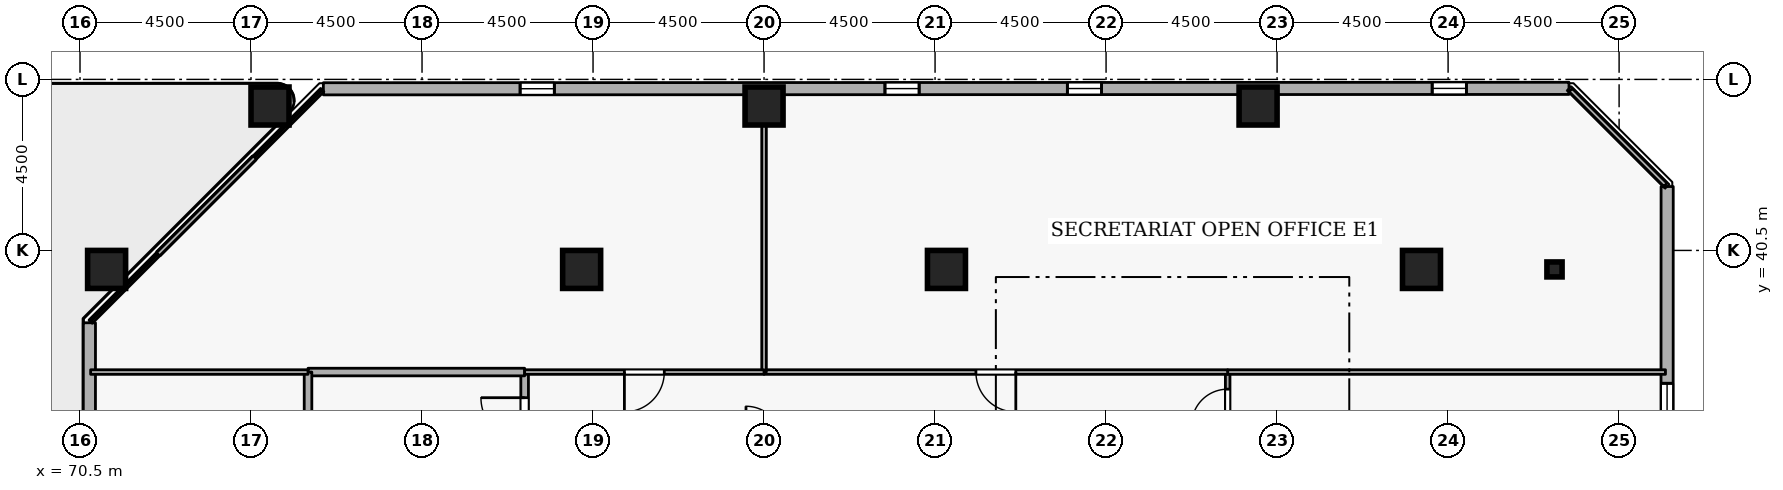
"""IFC4 building model, lengths in metres.
Left out: names, types, materials, properties, quantities, classifications, styles, units other than length and angle.
Written with IfcOpenShell. Run it as: python <this file> out.ifc"""

import sys

from ifc_helpers import new_model, si_unit, direction, frame, frame_2d, origin, origin_2d, place, context, subcontext, project, spatial, rectangle, i_section, extrude, element, fill, save


model = new_model("IFC4")
c1 = context("Model", 3, precision=1e-05, world=origin(), true_north=direction((0.0, 1.0)))
c2 = subcontext(c1, "Body", "Model", "MODEL_VIEW")
j1 = project(units=[si_unit("LENGTHUNIT", "METRE"), si_unit("PLANEANGLEUNIT", "RADIAN")], contexts=[c1])
p1 = place(None, origin())
s1 = spatial("IfcSite", under=j1, at=p1, CompositionType="ELEMENT")
p2 = place(p1, origin())
s2 = spatial("IfcBuilding", under=s1, at=p2, CompositionType="ELEMENT")
p3 = place(p2, frame((0.0, 0.0, 229.5)))
s3 = spatial("IfcBuildingStorey", under=s2, at=p3, CompositionType="ELEMENT", Elevation=229.5)
for number, where, z_axis, x_axis in (
    (1, (105.8, 40.0, 0.0), (0.0, 0.0, 1.0), (1.0, 0.0, 0.0)),
    (2, (101.5, 44.3, 0.0), (0.0, 0.0, 1.0), (1.0, 0.0, 0.0)),
    (3, (88.5, 44.3, 0.0), (0.0, 0.0, 1.0), (1.0, 0.0, 0.0)),
    (4, (75.5, 44.3, 0.0), (0.0, 0.0, 1.0), (1.0, 0.0, 0.0)),
    (5, (71.2, 40.0, 0.0), (0.0, 0.0, 1.0), (1.0, 0.0, 0.0)),
    (6, (93.3, 40.0, 0.0), (0.0, 0.0, 1.0), (1.0, 0.0, 0.0)),
    (7, (83.7, 40.0, 0.0), (0.0, 0.0, 1.0), (1.0, 0.0, 0.0)),
):
    element("IfcColumn", number, at=place(p3, frame(where, z_axis=z_axis, x_axis=x_axis)), inside=s3, PredefinedType="COLUMN", context=c2, shape_type="SweptSolid", body=[
        extrude(rectangle(XDim=1.0, YDim=1.0, at=origin_2d()), origin(), (0.0, 0.0, 1.0), 3.6),
    ])
p4 = place(p3, frame((109.3, 40.0, 0.0), z_axis=(0.0, 0.0, 1.0), x_axis=(1.0, 0.0, 0.0)))
e8 = element("IfcColumn", 8, at=p4, inside=s3, PredefinedType="COLUMN", context=c2, shape_type="SweptSolid", body=[
    extrude(i_section(OverallWidth=0.399, OverallDepth=0.394, WebThickness=0.023, FlangeThickness=0.037, FilletRadius=0.015, at=origin_2d()), origin(), (0.0, 0.0, 1.0), 3.6),
])
p5 = place(p3, frame((112.253, 9.404, 0.0), z_axis=(0.0, 0.0, 1.0), x_axis=(0.000364968916, 0.999999933399, 0.0)))
e9 = element("IfcWall", 9, at=p5, inside=s3, PredefinedType="STANDARD", context=c2, shape_type="SweptSolid", body=[
    extrude(rectangle(XDim=32.778, YDim=0.32, at=frame_2d((16.389, 0.0))), origin(), (0.0, 0.0, 1.0), 2.7),
])
p6 = place(p5, frame((2.7, 0.0, 0.72)))
e10 = element("IfcOpeningElement", 10, at=p6, cuts=e9, PredefinedType="OPENING", context=c2, shape_type="SweptSolid", body=[
    extrude(rectangle(XDim=0.9, YDim=1.75, at=frame_2d((0.45, 0.875))), frame((0.0, 0.17, 0.0), z_axis=(0.0, -1.0, 0.0), x_axis=(1.0, 0.0, 0.0)), (0.0, 0.0, 1.0), 0.34),
])
p7 = place(p5, frame((12.3, 0.0, 0.72)))
e11 = element("IfcOpeningElement", 11, at=p7, cuts=e9, PredefinedType="OPENING", context=c2, shape_type="SweptSolid", body=[
    extrude(rectangle(XDim=0.9, YDim=1.75, at=frame_2d((0.45, 0.875))), frame((0.0, 0.17, 0.0), z_axis=(0.0, -1.0, 0.0), x_axis=(1.0, 0.0, 0.0)), (0.0, 0.0, 1.0), 0.34),
])
p8 = place(p5, frame((17.1, 0.0, 0.72)))
e12 = element("IfcOpeningElement", 12, at=p8, cuts=e9, PredefinedType="OPENING", context=c2, shape_type="SweptSolid", body=[
    extrude(rectangle(XDim=0.9, YDim=1.75, at=frame_2d((0.45, 0.875))), frame((0.0, 0.17, 0.0), z_axis=(0.0, -1.0, 0.0), x_axis=(1.0, 0.0, 0.0)), (0.0, 0.0, 1.0), 0.34),
])
p9 = place(p5, frame((21.9, 0.0, 0.72)))
e13 = element("IfcOpeningElement", 13, at=p9, cuts=e9, PredefinedType="OPENING", context=c2, shape_type="SweptSolid", body=[
    extrude(rectangle(XDim=0.9, YDim=1.75, at=frame_2d((0.45, 0.875))), frame((0.0, 0.17, 0.0), z_axis=(0.0, -1.0, 0.0), x_axis=(1.0, 0.0, 0.0)), (0.0, 0.0, 1.0), 0.34),
])
p10 = place(p5, frame((26.7, 0.0, 0.72)))
e14 = element("IfcOpeningElement", 14, at=p10, cuts=e9, PredefinedType="OPENING", context=c2, shape_type="SweptSolid", body=[
    extrude(rectangle(XDim=0.9, YDim=1.75, at=frame_2d((0.45, 0.875))), frame((0.0, 0.17, 0.0), z_axis=(0.0, -1.0, 0.0), x_axis=(1.0, 0.0, 0.0)), (0.0, 0.0, 1.0), 0.34),
])
p11 = place(p3, frame((109.681, 44.765, 0.0), z_axis=(0.0, 0.0, 1.0), x_axis=(-0.999999933399, -0.000364968916, 0.0)))
e15 = element("IfcWall", 15, at=p11, inside=s3, PredefinedType="STANDARD", context=c2, shape_type="SweptSolid", body=[
    extrude(rectangle(XDim=32.778, YDim=0.32, at=frame_2d((16.389, 0.0))), origin(), (0.0, 0.0, 1.0), 2.7),
])
p12 = place(p11, frame((2.7, 0.0, 0.72)))
e16 = element("IfcOpeningElement", 16, at=p12, cuts=e15, PredefinedType="OPENING", context=c2, shape_type="SweptSolid", body=[
    extrude(rectangle(XDim=0.9, YDim=1.75, at=frame_2d((0.45, 0.875))), frame((0.0, 0.17, 0.0), z_axis=(0.0, -1.0, 0.0), x_axis=(1.0, 0.0, 0.0)), (0.0, 0.0, 1.0), 0.34),
])
p13 = place(p11, frame((12.3, 0.0, 0.72)))
e17 = element("IfcOpeningElement", 17, at=p13, cuts=e15, PredefinedType="OPENING", context=c2, shape_type="SweptSolid", body=[
    extrude(rectangle(XDim=0.9, YDim=1.75, at=frame_2d((0.45, 0.875))), frame((0.0, 0.17, 0.0), z_axis=(0.0, -1.0, 0.0), x_axis=(1.0, 0.0, 0.0)), (0.0, 0.0, 1.0), 0.34),
])
p14 = place(p11, frame((17.1, 0.0, 0.72)))
e18 = element("IfcOpeningElement", 18, at=p14, cuts=e15, PredefinedType="OPENING", context=c2, shape_type="SweptSolid", body=[
    extrude(rectangle(XDim=0.9, YDim=1.75, at=frame_2d((0.45, 0.875))), frame((0.0, 0.17, 0.0), z_axis=(0.0, -1.0, 0.0), x_axis=(1.0, 0.0, 0.0)), (0.0, 0.0, 1.0), 0.34),
])
p15 = place(p11, frame((26.7, 0.0, 0.72)))
e19 = element("IfcOpeningElement", 19, at=p15, cuts=e15, PredefinedType="OPENING", context=c2, shape_type="SweptSolid", body=[
    extrude(rectangle(XDim=0.9, YDim=1.75, at=frame_2d((0.45, 0.875))), frame((0.0, 0.17, 0.0), z_axis=(0.0, -1.0, 0.0), x_axis=(1.0, 0.0, 0.0)), (0.0, 0.0, 1.0), 0.34),
])
p16 = place(p3, frame((70.747, 38.596, 0.0), z_axis=(0.0, 0.0, 1.0), x_axis=(-0.000364968916, -0.999999933399, 0.0)))
e20 = element("IfcWall", 20, at=p16, inside=s3, PredefinedType="STANDARD", context=c2, shape_type="SweptSolid", body=[
    extrude(rectangle(XDim=32.778, YDim=0.32, at=frame_2d((16.389, 0.0))), origin(), (0.0, 0.0, 1.0), 2.7),
])
p17 = place(p16, frame((19.914, 0.0, 0.0)))
e21 = element("IfcOpeningElement", 21, at=p17, cuts=e20, PredefinedType="OPENING", context=c2, shape_type="SweptSolid", body=[
    extrude(rectangle(XDim=1.15, YDim=2.1, at=frame_2d((0.575, 1.05))), frame((0.0, 0.17, 0.0), z_axis=(0.0, -1.0, 0.0), x_axis=(1.0, 0.0, 0.0)), (0.0, 0.0, 1.0), 0.34),
])
p18 = place(p16, frame((2.7, 0.0, 0.72)))
e22 = element("IfcOpeningElement", 22, at=p18, cuts=e20, PredefinedType="OPENING", context=c2, shape_type="SweptSolid", body=[
    extrude(rectangle(XDim=0.9, YDim=1.75, at=frame_2d((0.45, 0.875))), frame((0.0, 0.17, 0.0), z_axis=(0.0, -1.0, 0.0), x_axis=(1.0, 0.0, 0.0)), (0.0, 0.0, 1.0), 0.34),
])
p19 = place(p16, frame((7.5, 0.0, 0.72)))
e23 = element("IfcOpeningElement", 23, at=p19, cuts=e20, PredefinedType="OPENING", context=c2, shape_type="SweptSolid", body=[
    extrude(rectangle(XDim=0.9, YDim=1.75, at=frame_2d((0.45, 0.875))), frame((0.0, 0.17, 0.0), z_axis=(0.0, -1.0, 0.0), x_axis=(1.0, 0.0, 0.0)), (0.0, 0.0, 1.0), 0.34),
])
p20 = place(p16, frame((17.1, 0.0, 0.72)))
e24 = element("IfcOpeningElement", 24, at=p20, cuts=e20, PredefinedType="OPENING", context=c2, shape_type="SweptSolid", body=[
    extrude(rectangle(XDim=0.9, YDim=1.75, at=frame_2d((0.45, 0.875))), frame((0.0, 0.17, 0.0), z_axis=(0.0, -1.0, 0.0), x_axis=(1.0, 0.0, 0.0)), (0.0, 0.0, 1.0), 0.34),
])
p21 = place(p16, frame((21.9, 0.0, 0.72)))
e25 = element("IfcOpeningElement", 25, at=p21, cuts=e20, PredefinedType="OPENING", context=c2, shape_type="SweptSolid", body=[
    extrude(rectangle(XDim=0.9, YDim=1.75, at=frame_2d((0.45, 0.875))), frame((0.0, 0.17, 0.0), z_axis=(0.0, -1.0, 0.0), x_axis=(1.0, 0.0, 0.0)), (0.0, 0.0, 1.0), 0.34),
])
p22 = place(p16, frame((26.7, 0.0, 0.72)))
e26 = element("IfcOpeningElement", 26, at=p22, cuts=e20, PredefinedType="OPENING", context=c2, shape_type="SweptSolid", body=[
    extrude(rectangle(XDim=0.9, YDim=1.75, at=frame_2d((0.45, 0.875))), frame((0.0, 0.17, 0.0), z_axis=(0.0, -1.0, 0.0), x_axis=(1.0, 0.0, 0.0)), (0.0, 0.0, 1.0), 0.34),
])
p23 = place(p3, frame((82.2, 34.8, 0.0), z_axis=(0.0, 0.0, 1.0), x_axis=(0.0, 1.0, 0.0)))
e27 = element("IfcWall", 27, at=p23, inside=s3, PredefinedType="STANDARD", context=c2, shape_type="SweptSolid", body=[
    extrude(rectangle(XDim=2.5, YDim=0.2, at=frame_2d((1.25, 0.0))), origin(), (0.0, 0.0, 1.0), 3.3),
])
p24 = place(p23, frame((0.675, 0.0, 0.0)))
e28 = element("IfcOpeningElement", 28, at=p24, cuts=e27, PredefinedType="OPENING", context=c2, shape_type="SweptSolid", body=[
    extrude(rectangle(XDim=1.15, YDim=2.1, at=frame_2d((0.575, 1.05))), frame((0.0, 0.11, 0.0), z_axis=(0.0, -1.0, 0.0), x_axis=(1.0, 0.0, 0.0)), (0.0, 0.0, 1.0), 0.22),
])
p25 = place(p3, frame((82.2, 37.3, 0.0), z_axis=(0.0, 0.0, 1.0), x_axis=(-1.0, 0.0, 0.0)))
e29 = element("IfcWall", 29, at=p25, inside=s3, PredefinedType="STANDARD", context=c2, shape_type="SweptSolid", body=[
    extrude(rectangle(XDim=5.7, YDim=0.2, at=frame_2d((2.85, 0.0))), origin(), (0.0, 0.0, 1.0), 3.3),
])
p26 = place(p3, frame((76.5, 37.3, 0.0), z_axis=(0.0, 0.0, 1.0), x_axis=(0.0, -1.0, 0.0)))
e30 = element("IfcWall", 30, at=p26, inside=s3, PredefinedType="STANDARD", context=c2, shape_type="SweptSolid", body=[
    extrude(rectangle(XDim=2.5, YDim=0.2, at=frame_2d((1.25, 0.0))), origin(), (0.0, 0.0, 1.0), 3.3),
])
p27 = place(p3, frame((100.7, 35.45, 0.0), z_axis=(0.0, 0.0, 1.0), x_axis=(0.0, 1.0, 0.0)))
e31 = element("IfcWall", 31, at=p27, inside=s3, PredefinedType="PARTITIONING", context=c2, shape_type="SweptSolid", body=[
    extrude(rectangle(XDim=1.85, YDim=0.12, at=frame_2d((0.925, 0.0))), origin(), (0.0, 0.0, 1.0), 3.3),
])
p28 = place(p27, frame((0.45, 0.0, 0.0)))
e32 = element("IfcOpeningElement", 32, at=p28, cuts=e31, PredefinedType="OPENING", context=c2, shape_type="SweptSolid", body=[
    extrude(rectangle(XDim=0.95, YDim=2.1, at=frame_2d((0.475, 1.05))), frame((0.0, 0.07, 0.0), z_axis=(0.0, -1.0, 0.0), x_axis=(1.0, 0.0, 0.0)), (0.0, 0.0, 1.0), 0.14),
])
p29 = place(p3, frame((100.7, 37.3, 0.0), z_axis=(0.0, 0.0, 1.0), x_axis=(1.0, 0.0, 0.0)))
e33 = element("IfcWall", 33, at=p29, inside=s3, PredefinedType="PARTITIONING", context=c2, shape_type="SweptSolid", body=[
    extrude(rectangle(XDim=11.52, YDim=0.12, at=frame_2d((5.76, 0.0))), origin(), (0.0, 0.0, 1.0), 3.3),
])
p30 = place(p3, frame((100.7, 37.3, 0.0), z_axis=(0.0, 0.0, 1.0), x_axis=(-1.0, 0.0, 0.0)))
e34 = element("IfcWall", 34, at=p30, inside=s3, PredefinedType="PARTITIONING", context=c2, shape_type="SweptSolid", body=[
    extrude(rectangle(XDim=12.2, YDim=0.12, at=frame_2d((6.1, 0.0))), origin(), (0.0, 0.0, 1.0), 3.3),
])
p31 = place(p30, frame((5.575, 0.0, 0.0)))
e35 = element("IfcOpeningElement", 35, at=p31, cuts=e34, PredefinedType="OPENING", context=c2, shape_type="SweptSolid", body=[
    extrude(rectangle(XDim=1.05, YDim=2.1, at=frame_2d((0.525, 1.05))), frame((0.0, 0.07, 0.0), z_axis=(0.0, -1.0, 0.0), x_axis=(1.0, 0.0, 0.0)), (0.0, 0.0, 1.0), 0.14),
])
p32 = place(p3, frame((88.5, 37.3, 0.0), z_axis=(0.0, 0.0, 1.0), x_axis=(0.0, 1.0, 0.0)))
e36 = element("IfcWall", 36, at=p32, inside=s3, PredefinedType="PARTITIONING", context=c2, shape_type="SweptSolid", body=[
    extrude(rectangle(XDim=7.42, YDim=0.12, at=frame_2d((3.71, 0.0))), origin(), (0.0, 0.0, 1.0), 2.892),
])
p33 = place(p3, frame((109.725, 44.72, 0.0), z_axis=(0.0, 0.0, 1.0), x_axis=(0.707106781187, -0.707106781187, 0.0)))
e37 = element("IfcWall", 37, at=p33, inside=s3, PredefinedType="PARTITIONING", context=c2, shape_type="SweptSolid", body=[
    extrude(rectangle(XDim=3.528, YDim=0.12, at=frame_2d((1.764, 0.0))), origin(), (0.0, 0.0, 1.0), 3.3),
])
p34 = place(p3, frame((76.5, 37.3, 0.0), z_axis=(0.0, 0.0, 1.0), x_axis=(-1.0, 0.0, 0.0)))
e38 = element("IfcWall", 38, at=p34, inside=s3, PredefinedType="PARTITIONING", context=c2, shape_type="SweptSolid", body=[
    extrude(rectangle(XDim=5.72, YDim=0.12, at=frame_2d((2.86, 0.0))), origin(), (0.0, 0.0, 1.0), 3.3),
])
p35 = place(p3, frame((70.78, 38.625, 0.0), z_axis=(0.0, 0.0, 1.0), x_axis=(0.707106781187, 0.707106781187, 0.0)))
e39 = element("IfcWall", 39, at=p35, inside=s3, PredefinedType="PARTITIONING", context=c2, shape_type="SweptSolid", body=[
    extrude(rectangle(XDim=8.619, YDim=0.12, at=frame_2d((4.31, 0.0))), origin(), (0.0, 0.0, 1.0), 3.3),
])
p36 = place(p3, frame((88.5, 37.3, 0.0), z_axis=(0.0, 0.0, 1.0), x_axis=(-1.0, 0.0, 0.0)))
e40 = element("IfcWall", 40, at=p36, inside=s3, PredefinedType="PARTITIONING", context=c2, shape_type="SweptSolid", body=[
    extrude(rectangle(XDim=6.3, YDim=0.12, at=frame_2d((3.15, 0.0))), origin(), (0.0, 0.0, 1.0), 3.3),
])
p37 = place(p36, frame((2.625, 0.0, 0.0)))
e41 = element("IfcOpeningElement", 41, at=p37, cuts=e40, PredefinedType="OPENING", context=c2, shape_type="SweptSolid", body=[
    extrude(rectangle(XDim=1.05, YDim=2.1, at=frame_2d((0.525, 1.05))), frame((0.0, 0.07, 0.0), z_axis=(0.0, -1.0, 0.0), x_axis=(1.0, 0.0, 0.0)), (0.0, 0.0, 1.0), 0.14),
])
p38 = place(p10, origin())
e42 = element("IfcWindow", 42, at=p38, inside=s3, PartitioningType="SINGLE_PANEL", PredefinedType="WINDOW", context=c2, shape_type="SweptSolid", body=[
    extrude(rectangle(XDim=0.9, YDim=1.75, at=frame_2d((0.45, 0.875))), frame((0.0, 0.03, 0.0), z_axis=(0.0, -1.0, 0.0), x_axis=(1.0, 0.0, 0.0)), (0.0, 0.0, 1.0), 0.06),
])
fill(e14, e42)
p39 = place(p12, origin())
e43 = element("IfcWindow", 43, at=p39, inside=s3, PartitioningType="SINGLE_PANEL", PredefinedType="WINDOW", context=c2, shape_type="SweptSolid", body=[
    extrude(rectangle(XDim=0.9, YDim=1.75, at=frame_2d((0.45, 0.875))), frame((0.0, 0.03, 0.0), z_axis=(0.0, -1.0, 0.0), x_axis=(1.0, 0.0, 0.0)), (0.0, 0.0, 1.0), 0.06),
])
fill(e16, e43)
p40 = place(p13, origin())
e44 = element("IfcWindow", 44, at=p40, inside=s3, PartitioningType="SINGLE_PANEL", PredefinedType="WINDOW", context=c2, shape_type="SweptSolid", body=[
    extrude(rectangle(XDim=0.9, YDim=1.75, at=frame_2d((0.45, 0.875))), frame((0.0, 0.03, 0.0), z_axis=(0.0, -1.0, 0.0), x_axis=(1.0, 0.0, 0.0)), (0.0, 0.0, 1.0), 0.06),
])
fill(e17, e44)
p41 = place(p14, origin())
e45 = element("IfcWindow", 45, at=p41, inside=s3, PartitioningType="SINGLE_PANEL", PredefinedType="WINDOW", context=c2, shape_type="SweptSolid", body=[
    extrude(rectangle(XDim=0.9, YDim=1.75, at=frame_2d((0.45, 0.875))), frame((0.0, 0.03, 0.0), z_axis=(0.0, -1.0, 0.0), x_axis=(1.0, 0.0, 0.0)), (0.0, 0.0, 1.0), 0.06),
])
fill(e18, e45)
p42 = place(p15, origin())
e46 = element("IfcWindow", 46, at=p42, inside=s3, PartitioningType="SINGLE_PANEL", PredefinedType="WINDOW", context=c2, shape_type="SweptSolid", body=[
    extrude(rectangle(XDim=0.9, YDim=1.75, at=frame_2d((0.45, 0.875))), frame((0.0, 0.03, 0.0), z_axis=(0.0, -1.0, 0.0), x_axis=(1.0, 0.0, 0.0)), (0.0, 0.0, 1.0), 0.06),
])
fill(e19, e46)
p43 = place(p24, origin())
e47 = element("IfcDoor", 47, at=p43, inside=s3, OperationType="SINGLE_SWING_RIGHT", PredefinedType="DOOR", context=c2, shape_type="SweptSolid", body=[
    extrude(rectangle(XDim=1.15, YDim=2.1, at=frame_2d((0.575, 1.05))), frame((0.0, 0.025, 0.0), z_axis=(0.0, -1.0, 0.0), x_axis=(1.0, 0.0, 0.0)), (0.0, 0.0, 1.0), 0.05),
])
fill(e28, e47)
p44 = place(p28, origin())
e48 = element("IfcDoor", 48, at=p44, inside=s3, OperationType="SINGLE_SWING_LEFT", PredefinedType="DOOR", context=c2, shape_type="SweptSolid", body=[
    extrude(rectangle(XDim=0.95, YDim=2.1, at=frame_2d((0.475, 1.05))), frame((0.0, 0.025, 0.0), z_axis=(0.0, -1.0, 0.0), x_axis=(1.0, 0.0, 0.0)), (0.0, 0.0, 1.0), 0.05),
])
fill(e32, e48)
p45 = place(p31, origin())
e49 = element("IfcDoor", 49, at=p45, inside=s3, OperationType="SINGLE_SWING_LEFT", PredefinedType="DOOR", context=c2, shape_type="SweptSolid", body=[
    extrude(rectangle(XDim=1.05, YDim=2.1, at=frame_2d((0.525, 1.05))), frame((0.0, 0.025, 0.0), z_axis=(0.0, -1.0, 0.0), x_axis=(1.0, 0.0, 0.0)), (0.0, 0.0, 1.0), 0.05),
])
fill(e35, e49)
p46 = place(p37, origin())
e50 = element("IfcDoor", 50, at=p46, inside=s3, OperationType="SINGLE_SWING_RIGHT", PredefinedType="DOOR", context=c2, shape_type="SweptSolid", body=[
    extrude(rectangle(XDim=1.05, YDim=2.1, at=frame_2d((0.525, 1.05))), frame((0.0, 0.025, 0.0), z_axis=(0.0, -1.0, 0.0), x_axis=(1.0, 0.0, 0.0)), (0.0, 0.0, 1.0), 0.05),
])
fill(e41, e50)
save(model, sys.argv[1])
